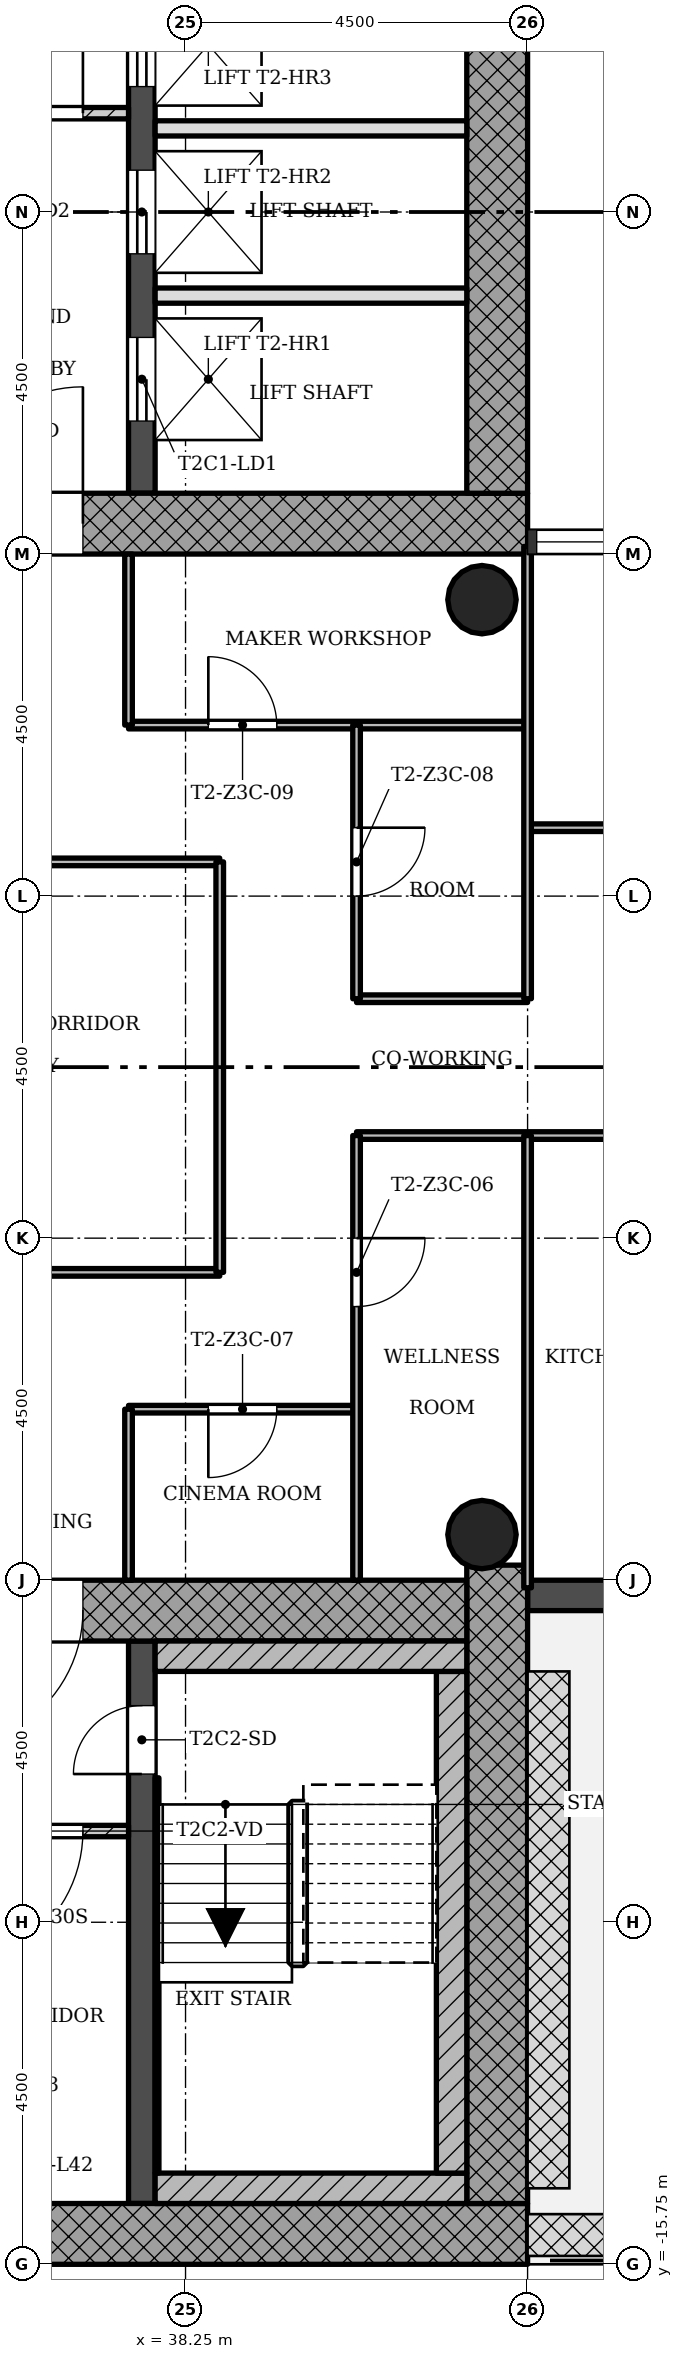
"""IFC4 building model, lengths in metres.
Left out: names, types, materials, properties, quantities, classifications, styles, units other than length and angle.
Written with IfcOpenShell. Run it as: python <this file> out.ifc"""

import sys

from ifc_helpers import new_model, si_unit, direction, frame, frame_2d, origin, origin_2d, place, context, subcontext, project, spatial, rectangle, hollow_circle, extrude, element, fill, save


model = new_model("IFC4")
c1 = context("Model", 3, precision=1e-05, world=origin(), true_north=direction((0.0, 1.0)))
c2 = subcontext(c1, "Body", "Model", "MODEL_VIEW")
j1 = project(units=[si_unit("LENGTHUNIT", "METRE"), si_unit("PLANEANGLEUNIT", "RADIAN")], contexts=[c1])
p1 = place(None, origin())
s1 = spatial("IfcSite", under=j1, at=p1, CompositionType="ELEMENT")
p2 = place(p1, origin())
s2 = spatial("IfcBuilding", under=s1, at=p2, CompositionType="ELEMENT")
p3 = place(p2, frame((0.0, 0.0, 154.1)))
s3 = spatial("IfcBuildingStorey", under=s2, at=p3, CompositionType="ELEMENT", Elevation=154.1)
p4 = place(p3, frame((30.05, 7.15, 0.0), z_axis=(0.0, 0.0, 1.0), x_axis=(1.0, 0.0, 0.0)))
e1 = element("IfcWall", 1, at=p4, inside=s3, PredefinedType="SHEAR", context=c2, shape_type="SweptSolid", body=[
    extrude(rectangle(XDim=12.7, YDim=0.8, at=frame_2d((6.35, 0.0))), origin(), (0.0, 0.0, 1.0), 3.4),
])
p5 = place(p4, frame((5.05, 0.0, 0.0)))
e2 = element("IfcOpeningElement", 2, at=p5, cuts=e1, PredefinedType="OPENING", context=c2, shape_type="SweptSolid", body=[
    extrude(rectangle(XDim=1.8, YDim=2.1, at=frame_2d((0.9, 1.05))), frame((0.0, 0.41, 0.0), z_axis=(0.0, -1.0, 0.0), x_axis=(1.0, 0.0, 0.0)), (0.0, 0.0, 1.0), 0.82),
])
p6 = place(p3, frame((42.35, 7.55, 0.0), z_axis=(0.0, 0.0, 1.0), x_axis=(0.0, 1.0, 0.0)))
e3 = element("IfcWall", 3, at=p6, inside=s3, PredefinedType="SHEAR", context=c2, shape_type="SweptSolid", body=[
    extrude(rectangle(XDim=8.2, YDim=0.8, at=frame_2d((4.1, 0.0))), origin(), (0.0, 0.0, 1.0), 3.4),
])
p7 = place(p3, frame((37.675, 7.55, 0.0), z_axis=(0.0, 0.0, 1.0), x_axis=(0.0, 1.0, 0.0)))
e4 = element("IfcWall", 4, at=p7, inside=s3, PredefinedType="SHEAR", context=c2, shape_type="SweptSolid", body=[
    extrude(rectangle(XDim=7.4, YDim=0.35, at=frame_2d((3.7, 0.0))), origin(), (0.0, 0.0, 1.0), 3.4),
])
p8 = place(p7, frame((0.95, 0.0, 0.0)))
e5 = element("IfcOpeningElement", 5, at=p8, cuts=e4, PredefinedType="OPENING", context=c2, shape_type="SweptSolid", body=[
    extrude(rectangle(XDim=1.1, YDim=2.1, at=frame_2d((0.55, 1.05))), frame((0.0, 0.185, 0.0), z_axis=(0.0, -1.0, 0.0), x_axis=(1.0, 0.0, 0.0)), (0.0, 0.0, 1.0), 0.37),
])
p9 = place(p7, frame((3.15, 0.0, 0.0)))
e6 = element("IfcOpeningElement", 6, at=p9, cuts=e4, PredefinedType="OPENING", context=c2, shape_type="SweptSolid", body=[
    extrude(rectangle(XDim=1.1, YDim=2.1, at=frame_2d((0.55, 1.05))), frame((0.0, 0.185, 0.0), z_axis=(0.0, -1.0, 0.0), x_axis=(1.0, 0.0, 0.0)), (0.0, 0.0, 1.0), 0.37),
])
p10 = place(p7, frame((5.35, 0.0, 0.0)))
e7 = element("IfcOpeningElement", 7, at=p10, cuts=e4, PredefinedType="OPENING", context=c2, shape_type="SweptSolid", body=[
    extrude(rectangle(XDim=1.1, YDim=2.1, at=frame_2d((0.55, 1.05))), frame((0.0, 0.185, 0.0), z_axis=(0.0, -1.0, 0.0), x_axis=(1.0, 0.0, 0.0)), (0.0, 0.0, 1.0), 0.37),
])
p11 = place(p3, frame((30.05, -15.35, 0.0), z_axis=(0.0, 0.0, 1.0), x_axis=(1.0, 0.0, 0.0)))
e8 = element("IfcWall", 8, at=p11, inside=s3, PredefinedType="SHEAR", context=c2, shape_type="SweptSolid", body=[
    extrude(rectangle(XDim=12.7, YDim=0.8, at=frame_2d((6.35, 0.0))), origin(), (0.0, 0.0, 1.0), 3.4),
])
p12 = place(p11, frame((5.5, 0.0, 0.45)))
e9 = element("IfcOpeningElement", 9, at=p12, cuts=e8, PredefinedType="OPENING", context=c2, shape_type="SweptSolid", body=[
    extrude(rectangle(XDim=0.9, YDim=2.4, at=frame_2d((0.45, 1.2))), frame((0.0, 0.41, 0.0), z_axis=(0.0, -1.0, 0.0), x_axis=(1.0, 0.0, 0.0)), (0.0, 0.0, 1.0), 0.82),
])
p13 = place(p3, frame((42.35, -14.95, 0.0), z_axis=(0.0, 0.0, 1.0), x_axis=(0.0, 1.0, 0.0)))
e10 = element("IfcWall", 10, at=p13, inside=s3, PredefinedType="SHEAR", context=c2, shape_type="SweptSolid", body=[
    extrude(rectangle(XDim=8.398, YDim=0.8, at=frame_2d((4.199, 0.0))), origin(), (0.0, 0.0, 1.0), 3.4),
])
p14 = place(p3, frame((41.95, -7.15, 0.0), z_axis=(0.0, 0.0, 1.0), x_axis=(-1.0, 0.0, 0.0)))
e11 = element("IfcWall", 11, at=p14, inside=s3, PredefinedType="SHEAR", context=c2, shape_type="SweptSolid", body=[
    extrude(rectangle(XDim=12.7, YDim=0.8, at=frame_2d((6.35, 0.0))), origin(), (0.0, 0.0, 1.0), 3.4),
])
p15 = place(p14, frame((5.05, 0.0, 0.0)))
e12 = element("IfcOpeningElement", 12, at=p15, cuts=e11, PredefinedType="OPENING", context=c2, shape_type="SweptSolid", body=[
    extrude(rectangle(XDim=1.8, YDim=2.1, at=frame_2d((0.9, 1.05))), frame((0.0, 0.41, 0.0), z_axis=(0.0, -1.0, 0.0), x_axis=(1.0, 0.0, 0.0)), (0.0, 0.0, 1.0), 0.82),
])
p16 = place(p3, frame((37.675, -14.95, 0.0), z_axis=(0.0, 0.0, 1.0), x_axis=(0.0, 1.0, 0.0)))
e13 = element("IfcWall", 13, at=p16, inside=s3, PredefinedType="SHEAR", context=c2, shape_type="SweptSolid", body=[
    extrude(rectangle(XDim=7.4, YDim=0.35, at=frame_2d((3.7, 0.0))), origin(), (0.0, 0.0, 1.0), 3.4),
])
p17 = place(p16, frame((5.65, 0.0, 0.0)))
e14 = element("IfcOpeningElement", 14, at=p17, cuts=e13, PredefinedType="OPENING", context=c2, shape_type="SweptSolid", body=[
    extrude(rectangle(XDim=0.9, YDim=2.1, at=frame_2d((0.45, 1.05))), frame((0.0, 0.185, 0.0), z_axis=(0.0, -1.0, 0.0), x_axis=(1.0, 0.0, 0.0)), (0.0, 0.0, 1.0), 0.37),
])
for number, where, z_axis, x_axis in (
    (15, (42.15, -6.15, 0.0), (0.0, 0.0, 1.0), (1.0, 0.0, 0.0)),
    (16, (42.15, 6.15, 0.0), (0.0, 0.0, 1.0), (1.0, 0.0, 0.0)),
):
    element("IfcColumn", number, at=place(p3, frame(where, z_axis=z_axis, x_axis=x_axis)), inside=s3, PredefinedType="COLUMN", context=c2, shape_type="SweptSolid", body=[
        extrude(hollow_circle(Radius=0.45, WallThickness=0.032, at=origin_2d()), origin(), (0.0, 0.0, 1.0), 3.4),
    ])
p18 = place(p3, frame((42.75, -6.95, -0.02), z_axis=(0.0, 0.0, 1.0), x_axis=(1.0, 0.0, 0.0)))
e17 = element("IfcWall", 17, at=p18, inside=s3, PredefinedType="STANDARD", context=c2, shape_type="SweptSolid", body=[
    extrude(rectangle(XDim=4.5, YDim=0.4, at=frame_2d((2.25, 0.0))), origin(), (0.0, 0.0, 1.0), 3.12),
])
p19 = place(p18, frame((1.35, 0.0, 0.02)))
e18 = element("IfcOpeningElement", 18, at=p19, cuts=e17, PredefinedType="OPENING", context=c2, shape_type="SweptSolid", body=[
    extrude(rectangle(XDim=1.8, YDim=2.1, at=frame_2d((0.9, 1.05))), frame((0.0, 0.21, 0.0), z_axis=(0.0, -1.0, 0.0), x_axis=(1.0, 0.0, 0.0)), (0.0, 0.0, 1.0), 0.42),
])
p20 = place(p3, frame((37.5, 12.55, 0.0), z_axis=(0.0, 0.0, 1.0), x_axis=(-1.0, 0.0, 0.0)))
e19 = element("IfcWall", 19, at=p20, inside=s3, PredefinedType="PARTITIONING", context=c2, shape_type="SweptSolid", body=[
    extrude(rectangle(XDim=3.0, YDim=0.15, at=frame_2d((1.5, 0.0))), origin(), (0.0, 0.0, 1.0), 3.0),
])
p21 = place(p20, frame((0.6, 0.0, 0.0)))
e20 = element("IfcOpeningElement", 20, at=p21, cuts=e19, PredefinedType="OPENING", context=c2, shape_type="SweptSolid", body=[
    extrude(rectangle(XDim=1.8, YDim=2.1, at=frame_2d((0.9, 1.05))), frame((0.0, 0.085, 0.0), z_axis=(0.0, -1.0, 0.0), x_axis=(1.0, 0.0, 0.0)), (0.0, 0.0, 1.0), 0.17),
])
for number, where, z_axis, x_axis in (
    (21, (41.95, 10.15, 0.0), (0.0, 0.0, 1.0), (-1.0, 0.0, 0.0)),
    (22, (41.95, 12.35, 0.0), (0.0, 0.0, 1.0), (-1.0, 0.0, 0.0)),
):
    element("IfcWall", number, at=place(p3, frame(where, z_axis=z_axis, x_axis=x_axis)), inside=s3, PredefinedType="SOLIDWALL", context=c2, shape_type="SweptSolid", body=[
        extrude(rectangle(XDim=4.1, YDim=0.2, at=frame_2d((2.05, 0.0))), origin(), (0.0, 0.0, 1.0), 3.0),
    ])
p22 = place(p3, frame((34.5, -10.05, 0.0), z_axis=(0.0, 0.0, 1.0), x_axis=(1.0, 0.0, 0.0)))
e23 = element("IfcWall", 23, at=p22, inside=s3, PredefinedType="PARTITIONING", context=c2, shape_type="SweptSolid", body=[
    extrude(rectangle(XDim=3.0, YDim=0.15, at=frame_2d((1.5, 0.0))), origin(), (0.0, 0.0, 1.0), 3.0),
])
p23 = place(p22, frame((0.6, 0.0, 0.0)))
e24 = element("IfcOpeningElement", 24, at=p23, cuts=e23, PredefinedType="OPENING", context=c2, shape_type="SweptSolid", body=[
    extrude(rectangle(XDim=1.8, YDim=2.1, at=frame_2d((0.9, 1.05))), frame((0.0, 0.085, 0.0), z_axis=(0.0, -1.0, 0.0), x_axis=(1.0, 0.0, 0.0)), (0.0, 0.0, 1.0), 0.17),
])
p24 = place(p3, frame((40.5, -4.5, 0.0), z_axis=(0.0, 0.0, 1.0), x_axis=(-1.0, 0.0, 0.0)))
e25 = element("IfcWall", 25, at=p24, inside=s3, PredefinedType="PARTITIONING", context=c2, shape_type="SweptSolid", body=[
    extrude(rectangle(XDim=3.0, YDim=0.1, at=frame_2d((1.5, 0.0))), origin(), (0.0, 0.0, 1.0), 3.0),
])
p25 = place(p24, frame((1.05, 0.0, 0.0)))
e26 = element("IfcOpeningElement", 26, at=p25, cuts=e25, PredefinedType="OPENING", context=c2, shape_type="SweptSolid", body=[
    extrude(rectangle(XDim=0.9, YDim=2.1, at=frame_2d((0.45, 1.05))), frame((0.0, 0.06, 0.0), z_axis=(0.0, -1.0, 0.0), x_axis=(1.0, 0.0, 0.0)), (0.0, 0.0, 1.0), 0.12),
])
p26 = place(p3, frame((38.7, -2.7, 0.0), z_axis=(0.0, 0.0, 1.0), x_axis=(-1.0, 0.0, 0.0)))
e27 = element("IfcWall", 27, at=p26, inside=s3, PredefinedType="PARTITIONING", context=c2, shape_type="SweptSolid", body=[
    extrude(rectangle(XDim=5.4, YDim=0.1, at=frame_2d((2.7, 0.0))), origin(), (0.0, 0.0, 1.0), 3.0),
])
p27 = place(p3, frame((44.55, -0.9, 0.0), z_axis=(0.0, 0.0, 1.0), x_axis=(-1.0, 0.0, 0.0)))
e28 = element("IfcWall", 28, at=p27, inside=s3, PredefinedType="PARTITIONING", context=c2, shape_type="SweptSolid", body=[
    extrude(rectangle(XDim=4.05, YDim=0.1, at=frame_2d((2.025, 0.0))), origin(), (0.0, 0.0, 1.0), 3.0),
])
p28 = place(p3, frame((42.75, 0.9, 0.0), z_axis=(0.0, 0.0, 1.0), x_axis=(-1.0, 0.0, 0.0)))
e29 = element("IfcWall", 29, at=p28, inside=s3, PredefinedType="PARTITIONING", context=c2, shape_type="SweptSolid", body=[
    extrude(rectangle(XDim=2.25, YDim=0.1, at=frame_2d((1.125, 0.0))), origin(), (0.0, 0.0, 1.0), 3.0),
])
p29 = place(p3, frame((38.7, 2.7, 0.0), z_axis=(0.0, 0.0, 1.0), x_axis=(-1.0, 0.0, 0.0)))
e30 = element("IfcWall", 30, at=p29, inside=s3, PredefinedType="PARTITIONING", context=c2, shape_type="SweptSolid", body=[
    extrude(rectangle(XDim=5.4, YDim=0.1, at=frame_2d((2.7, 0.0))), origin(), (0.0, 0.0, 1.0), 3.0),
])
p30 = place(p3, frame((47.25, 3.15, 0.0), z_axis=(0.0, 0.0, 1.0), x_axis=(-1.0, 0.0, 0.0)))
e31 = element("IfcWall", 31, at=p30, inside=s3, PredefinedType="PARTITIONING", context=c2, shape_type="SweptSolid", body=[
    extrude(rectangle(XDim=4.5, YDim=0.1, at=frame_2d((2.25, 0.0))), origin(), (0.0, 0.0, 1.0), 3.0),
])
p31 = place(p30, frame((1.8, 0.0, 0.0)))
e32 = element("IfcOpeningElement", 32, at=p31, cuts=e31, PredefinedType="OPENING", context=c2, shape_type="SweptSolid", body=[
    extrude(rectangle(XDim=0.9, YDim=2.1, at=frame_2d((0.45, 1.05))), frame((0.0, 0.06, 0.0), z_axis=(0.0, -1.0, 0.0), x_axis=(1.0, 0.0, 0.0)), (0.0, 0.0, 1.0), 0.12),
])
p32 = place(p3, frame((42.75, 4.5, 0.0), z_axis=(0.0, 0.0, 1.0), x_axis=(-1.0, 0.0, 0.0)))
e33 = element("IfcWall", 33, at=p32, inside=s3, PredefinedType="PARTITIONING", context=c2, shape_type="SweptSolid", body=[
    extrude(rectangle(XDim=5.25, YDim=0.1, at=frame_2d((2.625, 0.0))), origin(), (0.0, 0.0, 1.0), 3.0),
])
p33 = place(p32, frame((3.3, 0.0, 0.0)))
e34 = element("IfcOpeningElement", 34, at=p33, cuts=e33, PredefinedType="OPENING", context=c2, shape_type="SweptSolid", body=[
    extrude(rectangle(XDim=0.9, YDim=2.1, at=frame_2d((0.45, 1.05))), frame((0.0, 0.06, 0.0), z_axis=(0.0, -1.0, 0.0), x_axis=(1.0, 0.0, 0.0)), (0.0, 0.0, 1.0), 0.12),
])
for number, where, z_axis, x_axis in (
    (35, (42.75, -6.85, 0.0), (0.0, 0.0, 1.0), (0.0, 1.0, 0.0)),
    (36, (42.75, 0.9, 0.0), (0.0, 0.0, 1.0), (0.0, 1.0, 0.0)),
):
    element("IfcWall", number, at=place(p3, frame(where, z_axis=z_axis, x_axis=x_axis)), inside=s3, PredefinedType="PARTITIONING", context=c2, shape_type="SweptSolid", body=[
        extrude(rectangle(XDim=5.95, YDim=0.1, at=frame_2d((2.975, 0.0))), origin(), (0.0, 0.0, 1.0), 3.0),
    ])
p34 = place(p3, frame((40.5, -6.75, 0.0), z_axis=(0.0, 0.0, 1.0), x_axis=(0.0, 1.0, 0.0)))
e37 = element("IfcWall", 37, at=p34, inside=s3, PredefinedType="PARTITIONING", context=c2, shape_type="SweptSolid", body=[
    extrude(rectangle(XDim=5.85, YDim=0.1, at=frame_2d((2.925, 0.0))), origin(), (0.0, 0.0, 1.0), 3.0),
])
p35 = place(p34, frame((3.6, 0.0, 0.0)))
e38 = element("IfcOpeningElement", 38, at=p35, cuts=e37, PredefinedType="OPENING", context=c2, shape_type="SweptSolid", body=[
    extrude(rectangle(XDim=0.9, YDim=2.1, at=frame_2d((0.45, 1.05))), frame((0.0, 0.06, 0.0), z_axis=(0.0, -1.0, 0.0), x_axis=(1.0, 0.0, 0.0)), (0.0, 0.0, 1.0), 0.12),
])
p36 = place(p3, frame((40.5, 0.9, 0.0), z_axis=(0.0, 0.0, 1.0), x_axis=(0.0, 1.0, 0.0)))
e39 = element("IfcWall", 39, at=p36, inside=s3, PredefinedType="PARTITIONING", context=c2, shape_type="SweptSolid", body=[
    extrude(rectangle(XDim=3.6, YDim=0.1, at=frame_2d((1.8, 0.0))), origin(), (0.0, 0.0, 1.0), 3.0),
])
p37 = place(p36, frame((1.35, 0.0, 0.0)))
e40 = element("IfcOpeningElement", 40, at=p37, cuts=e39, PredefinedType="OPENING", context=c2, shape_type="SweptSolid", body=[
    extrude(rectangle(XDim=0.9, YDim=2.1, at=frame_2d((0.45, 1.05))), frame((0.0, 0.06, 0.0), z_axis=(0.0, -1.0, 0.0), x_axis=(1.0, 0.0, 0.0)), (0.0, 0.0, 1.0), 0.12),
])
p38 = place(p3, frame((38.7, -2.7, 0.0), z_axis=(0.0, 0.0, 1.0), x_axis=(0.0, 1.0, 0.0)))
e41 = element("IfcWall", 41, at=p38, inside=s3, PredefinedType="PARTITIONING", context=c2, shape_type="SweptSolid", body=[
    extrude(rectangle(XDim=5.4, YDim=0.1, at=frame_2d((2.7, 0.0))), origin(), (0.0, 0.0, 1.0), 3.0),
])
for number, where, z_axis, x_axis in (
    (42, (37.5, -6.75, 0.0), (0.0, 0.0, 1.0), (0.0, 1.0, 0.0)),
    (43, (37.5, 4.5, 0.0), (0.0, 0.0, 1.0), (0.0, 1.0, 0.0)),
):
    element("IfcWall", number, at=place(p3, frame(where, z_axis=z_axis, x_axis=x_axis)), inside=s3, PredefinedType="PARTITIONING", context=c2, shape_type="SweptSolid", body=[
        extrude(rectangle(XDim=2.25, YDim=0.1, at=frame_2d((1.125, 0.0))), origin(), (0.0, 0.0, 1.0), 3.0),
    ])
p39 = place(p3, frame((37.85, -14.75, 0.0), z_axis=(0.0, 0.0, 1.0), x_axis=(1.0, 0.0, 0.0)))
e44 = element("IfcWall", 44, at=p39, inside=s3, PredefinedType="SHEAR", context=c2, shape_type="SweptSolid", body=[
    extrude(rectangle(XDim=4.1, YDim=0.4, at=frame_2d((2.05, 0.0))), origin(), (0.0, 0.0, 1.0), 3.4),
])
p40 = place(p3, frame((41.75, -7.95, 0.0), z_axis=(0.0, 0.0, 1.0), x_axis=(0.0, -1.0, 0.0)))
e45 = element("IfcWall", 45, at=p40, inside=s3, PredefinedType="SHEAR", context=c2, shape_type="SweptSolid", body=[
    extrude(rectangle(XDim=6.6, YDim=0.4, at=frame_2d((3.3, 0.0))), origin(), (0.0, 0.0, 1.0), 3.4),
])
p41 = place(p3, frame((37.85, -7.75, 0.0), z_axis=(0.0, 0.0, 1.0), x_axis=(1.0, 0.0, 0.0)))
e46 = element("IfcWall", 46, at=p41, inside=s3, PredefinedType="SHEAR", context=c2, shape_type="SweptSolid", body=[
    extrude(rectangle(XDim=4.1, YDim=0.4, at=frame_2d((2.05, 0.0))), origin(), (0.0, 0.0, 1.0), 3.4),
])
p42 = place(p3, frame((37.875, -9.35, 0.0), z_axis=(0.0, 0.0, 1.0), x_axis=(0.0, -1.0, 0.0)))
e47 = element("IfcWall", 47, at=p42, inside=s3, PredefinedType="SHEAR", context=c2, shape_type="SweptSolid", body=[
    extrude(rectangle(XDim=5.2, YDim=0.05, at=frame_2d((2.6, 0.0))), origin(), (0.0, 0.0, 1.0), 3.4),
])
p43 = place(p21, origin())
e48 = element("IfcDoor", 48, at=p43, inside=s3, OperationType="SINGLE_SWING_LEFT", PredefinedType="DOOR", context=c2, shape_type="SweptSolid", body=[
    extrude(rectangle(XDim=1.8, YDim=2.1, at=frame_2d((0.9, 1.05))), frame((0.0, 0.025, 0.0), z_axis=(0.0, -1.0, 0.0), x_axis=(1.0, 0.0, 0.0)), (0.0, 0.0, 1.0), 0.05),
])
fill(e20, e48)
p44 = place(p23, origin())
e49 = element("IfcDoor", 49, at=p44, inside=s3, OperationType="SINGLE_SWING_LEFT", PredefinedType="DOOR", context=c2, shape_type="SweptSolid", body=[
    extrude(rectangle(XDim=1.8, YDim=2.1, at=frame_2d((0.9, 1.05))), frame((0.0, 0.025, 0.0), z_axis=(0.0, -1.0, 0.0), x_axis=(1.0, 0.0, 0.0)), (0.0, 0.0, 1.0), 0.05),
])
fill(e24, e49)
p45 = place(p35, origin())
e50 = element("IfcDoor", 50, at=p45, inside=s3, OperationType="SINGLE_SWING_RIGHT", PredefinedType="DOOR", context=c2, shape_type="SweptSolid", body=[
    extrude(rectangle(XDim=0.9, YDim=2.1, at=frame_2d((0.45, 1.05))), frame((0.0, 0.025, 0.0), z_axis=(0.0, -1.0, 0.0), x_axis=(1.0, 0.0, 0.0)), (0.0, 0.0, 1.0), 0.05),
])
fill(e38, e50)
p46 = place(p25, origin())
e51 = element("IfcDoor", 51, at=p46, inside=s3, OperationType="SINGLE_SWING_LEFT", PredefinedType="DOOR", context=c2, shape_type="SweptSolid", body=[
    extrude(rectangle(XDim=0.9, YDim=2.1, at=frame_2d((0.45, 1.05))), frame((0.0, 0.025, 0.0), z_axis=(0.0, -1.0, 0.0), x_axis=(1.0, 0.0, 0.0)), (0.0, 0.0, 1.0), 0.05),
])
fill(e26, e51)
p47 = place(p37, origin())
e52 = element("IfcDoor", 52, at=p47, inside=s3, OperationType="SINGLE_SWING_RIGHT", PredefinedType="DOOR", context=c2, shape_type="SweptSolid", body=[
    extrude(rectangle(XDim=0.9, YDim=2.1, at=frame_2d((0.45, 1.05))), frame((0.0, 0.025, 0.0), z_axis=(0.0, -1.0, 0.0), x_axis=(1.0, 0.0, 0.0)), (0.0, 0.0, 1.0), 0.05),
])
fill(e40, e52)
p48 = place(p33, origin())
e53 = element("IfcDoor", 53, at=p48, inside=s3, OperationType="SINGLE_SWING_RIGHT", PredefinedType="DOOR", context=c2, shape_type="SweptSolid", body=[
    extrude(rectangle(XDim=0.9, YDim=2.1, at=frame_2d((0.45, 1.05))), frame((0.0, 0.025, 0.0), z_axis=(0.0, -1.0, 0.0), x_axis=(1.0, 0.0, 0.0)), (0.0, 0.0, 1.0), 0.05),
])
fill(e34, e53)
p49 = place(p8, origin())
e54 = element("IfcDoor", 54, at=p49, inside=s3, OperationType="SLIDING_TO_LEFT", PredefinedType="DOOR", context=c2, shape_type="SweptSolid", body=[
    extrude(rectangle(XDim=1.1, YDim=2.1, at=frame_2d((0.55, 1.05))), frame((0.0, 0.025, 0.0), z_axis=(0.0, -1.0, 0.0), x_axis=(1.0, 0.0, 0.0)), (0.0, 0.0, 1.0), 0.05),
])
fill(e5, e54)
p50 = place(p9, origin())
e55 = element("IfcDoor", 55, at=p50, inside=s3, OperationType="SLIDING_TO_LEFT", PredefinedType="DOOR", context=c2, shape_type="SweptSolid", body=[
    extrude(rectangle(XDim=1.1, YDim=2.1, at=frame_2d((0.55, 1.05))), frame((0.0, 0.025, 0.0), z_axis=(0.0, -1.0, 0.0), x_axis=(1.0, 0.0, 0.0)), (0.0, 0.0, 1.0), 0.05),
])
fill(e6, e55)
p51 = place(p10, origin())
e56 = element("IfcDoor", 56, at=p51, inside=s3, OperationType="SLIDING_TO_LEFT", PredefinedType="DOOR", context=c2, shape_type="SweptSolid", body=[
    extrude(rectangle(XDim=1.1, YDim=2.1, at=frame_2d((0.55, 1.05))), frame((0.0, 0.025, 0.0), z_axis=(0.0, -1.0, 0.0), x_axis=(1.0, 0.0, 0.0)), (0.0, 0.0, 1.0), 0.05),
])
fill(e7, e56)
p52 = place(p5, origin())
e57 = element("IfcDoor", 57, at=p52, inside=s3, OperationType="SINGLE_SWING_LEFT", PredefinedType="DOOR", context=c2, shape_type="SweptSolid", body=[
    extrude(rectangle(XDim=1.8, YDim=2.1, at=frame_2d((0.9, 1.05))), frame((0.0, 0.025, 0.0), z_axis=(0.0, -1.0, 0.0), x_axis=(1.0, 0.0, 0.0)), (0.0, 0.0, 1.0), 0.05),
])
fill(e2, e57)
p53 = place(p17, origin())
e58 = element("IfcDoor", 58, at=p53, inside=s3, OperationType="SINGLE_SWING_RIGHT", PredefinedType="DOOR", context=c2, shape_type="SweptSolid", body=[
    extrude(rectangle(XDim=0.9, YDim=2.1, at=frame_2d((0.45, 1.05))), frame((0.0, 0.025, 0.0), z_axis=(0.0, -1.0, 0.0), x_axis=(1.0, 0.0, 0.0)), (0.0, 0.0, 1.0), 0.05),
])
fill(e14, e58)
p54 = place(p15, origin())
e59 = element("IfcDoor", 59, at=p54, inside=s3, OperationType="SINGLE_SWING_LEFT", PredefinedType="DOOR", context=c2, shape_type="SweptSolid", body=[
    extrude(rectangle(XDim=1.8, YDim=2.1, at=frame_2d((0.9, 1.05))), frame((0.0, 0.025, 0.0), z_axis=(0.0, -1.0, 0.0), x_axis=(1.0, 0.0, 0.0)), (0.0, 0.0, 1.0), 0.05),
])
fill(e12, e59)
save(model, sys.argv[1])
